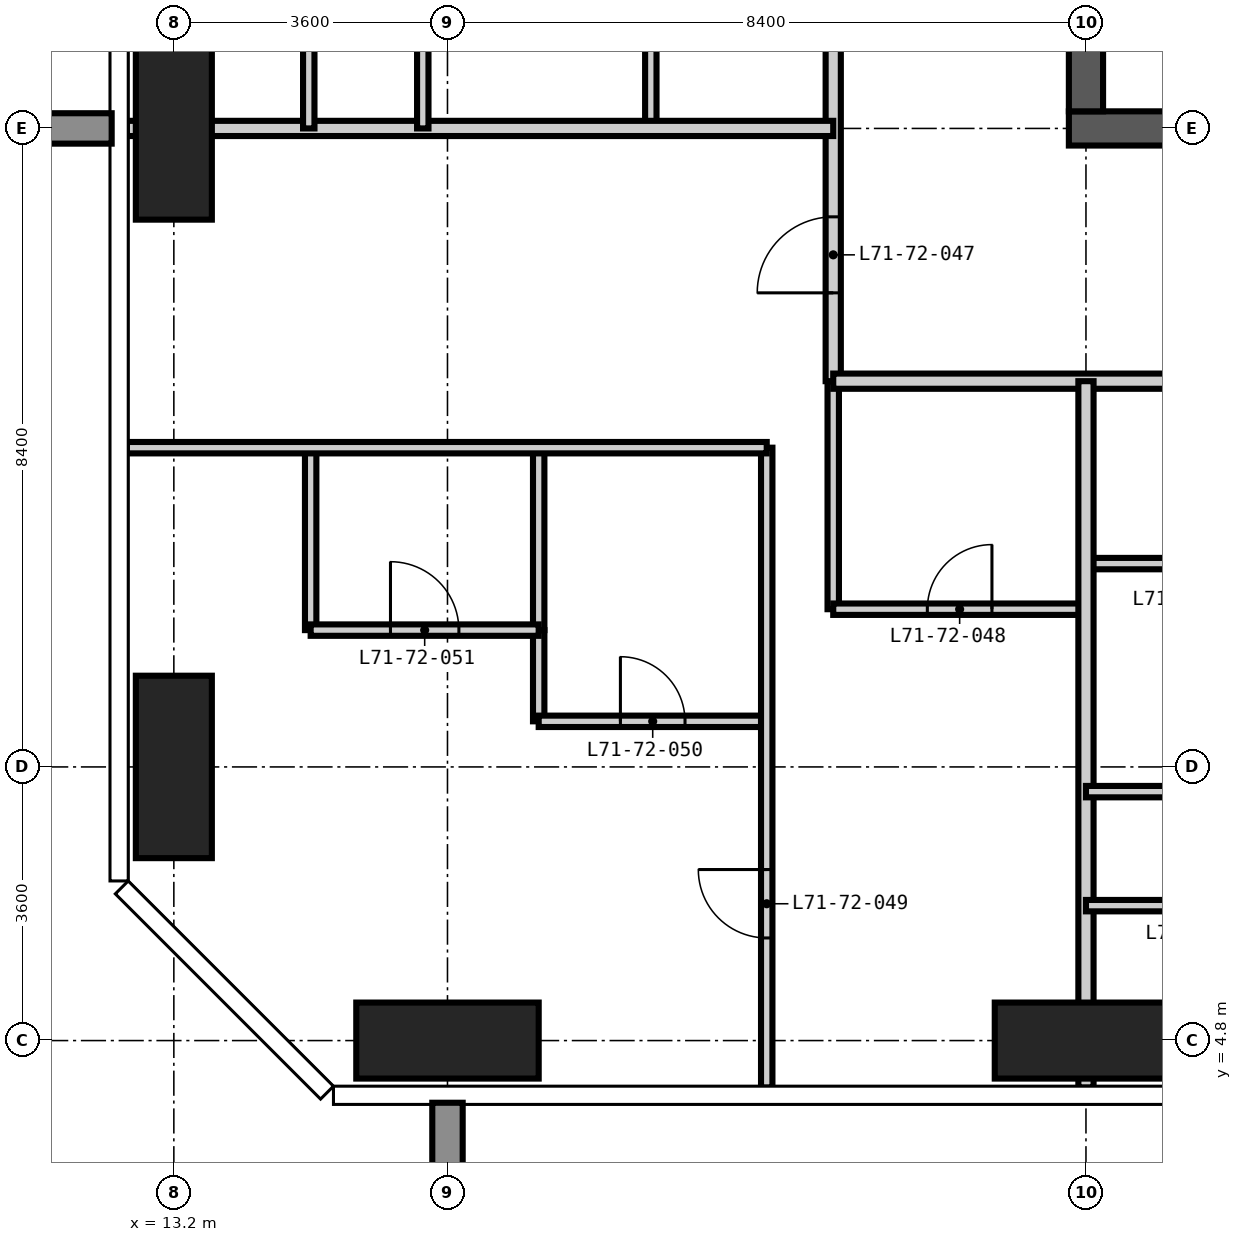
"""IFC4 building model, lengths in metres.
Left out: names, types, materials, properties, quantities, classifications, styles, units other than length and angle.
Written with IfcOpenShell. Run it as: python <this file> out.ifc"""

import sys

from ifc_helpers import new_model, si_unit, direction, frame, frame_2d, origin, origin_2d, place, context, subcontext, project, spatial, rectangle, extrude, element, fill, save


model = new_model("IFC4")
c1 = context("Model", 3, precision=1e-05, world=origin(), true_north=direction((0.0, 1.0)))
c2 = subcontext(c1, "Body", "Model", "MODEL_VIEW")
j1 = project(units=[si_unit("LENGTHUNIT", "METRE"), si_unit("PLANEANGLEUNIT", "RADIAN")], contexts=[c1])
p1 = place(None, origin())
s1 = spatial("IfcSite", under=j1, at=p1, CompositionType="ELEMENT")
p2 = place(p1, origin())
s2 = spatial("IfcBuilding", under=s1, at=p2, CompositionType="ELEMENT")
p3 = place(p2, frame((0.0, 0.0, 276.3)))
s3 = spatial("IfcBuildingStorey", under=s2, at=p3, CompositionType="ELEMENT", Elevation=276.3)
for number, where, z_axis, x_axis in (
    (1, (13.2, 8.4, -0.35), (0.0, 0.0, 1.0), (1.0, 0.0, 0.0)),
    (2, (13.2, 16.8, -0.35), (0.0, 0.0, 1.0), (1.0, 0.0, 0.0)),
):
    element("IfcColumn", number, at=place(p3, frame(where, z_axis=z_axis, x_axis=x_axis)), inside=s3, PredefinedType="COLUMN", context=c2, shape_type="SweptSolid", body=[
        extrude(rectangle(XDim=1.0, YDim=2.4, at=origin_2d()), origin(), (0.0, 0.0, 1.0), 3.9),
    ])
for number, where, z_axis, x_axis in (
    (3, (16.8, 4.8, -0.35), (0.0, 0.0, 1.0), (1.0, 0.0, 0.0)),
    (4, (25.2, 4.8, -0.35), (0.0, 0.0, 1.0), (1.0, 0.0, 0.0)),
):
    element("IfcColumn", number, at=place(p3, frame(where, z_axis=z_axis, x_axis=x_axis)), inside=s3, PredefinedType="COLUMN", context=c2, shape_type="SweptSolid", body=[
        extrude(rectangle(XDim=2.4, YDim=1.0, at=origin_2d()), origin(), (0.0, 0.0, 1.0), 3.9),
    ])
p4 = place(p3, frame((24.975, 16.8, -0.35), z_axis=(0.0, 0.0, 1.0), x_axis=(1.0, 0.0, 0.0)))
e5 = element("IfcWall", 5, at=p4, inside=s3, PredefinedType="SHEAR", context=c2, shape_type="SweptSolid", body=[
    extrude(rectangle(XDim=17.25, YDim=0.45, at=frame_2d((8.625, 0.0))), origin(), (0.0, 0.0, 1.0), 3.9),
])
p5 = place(p4, frame((3.925, 0.0, 0.35)))
e6 = element("IfcOpeningElement", 6, at=p5, cuts=e5, PredefinedType="OPENING", context=c2, shape_type="SweptSolid", body=[
    extrude(rectangle(XDim=1.0, YDim=2.1, at=frame_2d((0.5, 1.05))), frame((0.0, 0.235, 0.0), z_axis=(0.0, -1.0, 0.0), x_axis=(1.0, 0.0, 0.0)), (0.0, 0.0, 1.0), 0.47),
])
p6 = place(p4, frame((10.225, 0.0, 0.35)))
e7 = element("IfcOpeningElement", 7, at=p6, cuts=e5, PredefinedType="OPENING", context=c2, shape_type="SweptSolid", body=[
    extrude(rectangle(XDim=1.0, YDim=2.1, at=frame_2d((0.5, 1.05))), frame((0.0, 0.235, 0.0), z_axis=(0.0, -1.0, 0.0), x_axis=(1.0, 0.0, 0.0)), (0.0, 0.0, 1.0), 0.47),
])
p7 = place(p3, frame((25.2, 41.775, -0.35), z_axis=(0.0, 0.0, 1.0), x_axis=(0.0, -1.0, 0.0)))
e8 = element("IfcWall", 8, at=p7, inside=s3, PredefinedType="SHEAR", context=c2, shape_type="SweptSolid", body=[
    extrude(rectangle(XDim=24.75, YDim=0.45, at=frame_2d((12.375, 0.0))), origin(), (0.0, 0.0, 1.0), 3.9),
])
p8 = place(p7, frame((11.875, 0.0, 0.35)))
e9 = element("IfcOpeningElement", 9, at=p8, cuts=e8, PredefinedType="OPENING", context=c2, shape_type="SweptSolid", body=[
    extrude(rectangle(XDim=1.0, YDim=2.1, at=frame_2d((0.5, 1.05))), frame((0.0, 0.235, 0.0), z_axis=(0.0, -1.0, 0.0), x_axis=(1.0, 0.0, 0.0)), (0.0, 0.0, 1.0), 0.47),
])
p9 = place(p3, frame((18.0, 9.0, 0.0), z_axis=(0.0, 0.0, 1.0), x_axis=(0.0, 1.0, 0.0)))
e10 = element("IfcWall", 10, at=p9, inside=s3, PredefinedType="PARTITIONING", context=c2, shape_type="SweptSolid", body=[
    extrude(rectangle(XDim=1.2, YDim=0.15, at=frame_2d((0.6, 0.0))), origin(), (0.0, 0.0, 1.0), 3.55),
])
p10 = place(p3, frame((19.475, 16.8, 0.0), z_axis=(0.0, 0.0, 1.0), x_axis=(0.0, 1.0, 0.0)))
e11 = element("IfcWall", 11, at=p10, inside=s3, PredefinedType="PARTITIONING", context=c2, shape_type="SweptSolid", body=[
    extrude(rectangle(XDim=2.4, YDim=0.15, at=frame_2d((1.2, 0.0))), origin(), (0.0, 0.0, 1.0), 3.55),
])
p11 = place(p3, frame((21.875, 10.475, 0.0), z_axis=(0.0, 0.0, 1.0), x_axis=(0.0, 1.0, 0.0)))
e12 = element("IfcWall", 12, at=p11, inside=s3, PredefinedType="PARTITIONING", context=c2, shape_type="SweptSolid", body=[
    extrude(rectangle(XDim=3.0, YDim=0.15, at=frame_2d((1.5, 0.0))), origin(), (0.0, 0.0, 1.0), 3.55),
])
p12 = place(p3, frame((18.0, 9.0, 0.0), z_axis=(0.0, 0.0, 1.0), x_axis=(1.0, 0.0, 0.0)))
e13 = element("IfcWall", 13, at=p12, inside=s3, PredefinedType="PARTITIONING", context=c2, shape_type="SweptSolid", body=[
    extrude(rectangle(XDim=3.0, YDim=0.15, at=frame_2d((1.5, 0.0))), origin(), (0.0, 0.0, 1.0), 3.55),
])
p13 = place(p12, frame((1.075, 0.0, 0.0)))
e14 = element("IfcOpeningElement", 14, at=p13, cuts=e13, PredefinedType="OPENING", context=c2, shape_type="SweptSolid", body=[
    extrude(rectangle(XDim=0.85, YDim=2.1, at=frame_2d((0.425, 1.05))), frame((0.0, 0.085, 0.0), z_axis=(0.0, -1.0, 0.0), x_axis=(1.0, 0.0, 0.0)), (0.0, 0.0, 1.0), 0.17),
])
p14 = place(p3, frame((21.875, 10.475, 0.0), z_axis=(0.0, 0.0, 1.0), x_axis=(1.0, 0.0, 0.0)))
e15 = element("IfcWall", 15, at=p14, inside=s3, PredefinedType="PARTITIONING", context=c2, shape_type="SweptSolid", body=[
    extrude(rectangle(XDim=3.325, YDim=0.15, at=frame_2d((1.663, 0.0))), origin(), (0.0, 0.0, 1.0), 3.55),
])
p15 = place(p14, frame((1.238, 0.0, 0.0)))
e16 = element("IfcOpeningElement", 16, at=p15, cuts=e15, PredefinedType="OPENING", context=c2, shape_type="SweptSolid", body=[
    extrude(rectangle(XDim=0.85, YDim=2.1, at=frame_2d((0.425, 1.05))), frame((0.0, 0.085, 0.0), z_axis=(0.0, -1.0, 0.0), x_axis=(1.0, 0.0, 0.0)), (0.0, 0.0, 1.0), 0.17),
])
p16 = place(p3, frame((25.2, 11.075, 0.0), z_axis=(0.0, 0.0, 1.0), x_axis=(1.0, 0.0, 0.0)))
e17 = element("IfcWall", 17, at=p16, inside=s3, PredefinedType="PARTITIONING", context=c2, shape_type="SweptSolid", body=[
    extrude(rectangle(XDim=2.4, YDim=0.15, at=frame_2d((1.2, 0.0))), origin(), (0.0, 0.0, 1.0), 3.55),
])
p17 = place(p3, frame((21.875, 13.475, 0.0), z_axis=(0.0, 0.0, 1.0), x_axis=(0.0, 1.0, 0.0)))
e18 = element("IfcWall", 18, at=p17, inside=s3, PredefinedType="PARTITIONING", context=c2, shape_type="SweptSolid", body=[
    extrude(rectangle(XDim=31.25, YDim=0.2, at=frame_2d((15.625, 0.0))), origin(), (0.0, 0.0, 1.0), 3.55),
])
p18 = place(p17, frame((4.925, 0.0, 0.0)))
e19 = element("IfcOpeningElement", 19, at=p18, cuts=e18, PredefinedType="OPENING", context=c2, shape_type="SweptSolid", body=[
    extrude(rectangle(XDim=1.0, YDim=2.2, at=frame_2d((0.5, 1.1))), frame((0.0, 0.11, 0.0), z_axis=(0.0, -1.0, 0.0), x_axis=(1.0, 0.0, 0.0)), (0.0, 0.0, 1.0), 0.22),
])
p19 = place(p17, frame((11.225, 0.0, 0.0)))
e20 = element("IfcOpeningElement", 20, at=p19, cuts=e18, PredefinedType="OPENING", context=c2, shape_type="SweptSolid", body=[
    extrude(rectangle(XDim=1.0, YDim=2.2, at=frame_2d((0.5, 1.1))), frame((0.0, 0.11, 0.0), z_axis=(0.0, -1.0, 0.0), x_axis=(1.0, 0.0, 0.0)), (0.0, 0.0, 1.0), 0.22),
])
p20 = place(p17, frame((19.625, 0.0, 0.0)))
e21 = element("IfcOpeningElement", 21, at=p20, cuts=e18, PredefinedType="OPENING", context=c2, shape_type="SweptSolid", body=[
    extrude(rectangle(XDim=1.0, YDim=2.2, at=frame_2d((0.5, 1.1))), frame((0.0, 0.11, 0.0), z_axis=(0.0, -1.0, 0.0), x_axis=(1.0, 0.0, 0.0)), (0.0, 0.0, 1.0), 0.22),
])
p21 = place(p17, frame((25.925, 0.0, 0.0)))
e22 = element("IfcOpeningElement", 22, at=p21, cuts=e18, PredefinedType="OPENING", context=c2, shape_type="SweptSolid", body=[
    extrude(rectangle(XDim=1.0, YDim=2.2, at=frame_2d((0.5, 1.1))), frame((0.0, 0.11, 0.0), z_axis=(0.0, -1.0, 0.0), x_axis=(1.0, 0.0, 0.0)), (0.0, 0.0, 1.0), 0.22),
])
p22 = place(p17, frame((1.162, 0.0, 0.0)))
e23 = element("IfcOpeningElement", 23, at=p22, cuts=e18, PredefinedType="OPENING", context=c2, shape_type="SweptSolid", body=[
    extrude(rectangle(XDim=1.0, YDim=2.2, at=frame_2d((0.5, 1.1))), frame((0.0, 0.11, 0.0), z_axis=(0.0, -1.0, 0.0), x_axis=(1.0, 0.0, 0.0)), (0.0, 0.0, 1.0), 0.22),
])
p23 = place(p17, frame((29.387, 0.0, 0.0)))
e24 = element("IfcOpeningElement", 24, at=p23, cuts=e18, PredefinedType="OPENING", context=c2, shape_type="SweptSolid", body=[
    extrude(rectangle(XDim=1.0, YDim=2.2, at=frame_2d((0.5, 1.1))), frame((0.0, 0.11, 0.0), z_axis=(0.0, -1.0, 0.0), x_axis=(1.0, 0.0, 0.0)), (0.0, 0.0, 1.0), 0.22),
])
p24 = place(p3, frame((44.125, 13.475, 0.0), z_axis=(0.0, 0.0, 1.0), x_axis=(-1.0, 0.0, 0.0)))
e25 = element("IfcWall", 25, at=p24, inside=s3, PredefinedType="PARTITIONING", context=c2, shape_type="SweptSolid", body=[
    extrude(rectangle(XDim=22.25, YDim=0.2, at=frame_2d((11.125, 0.0))), origin(), (0.0, 0.0, 1.0), 3.55),
])
p25 = place(p24, frame((11.225, 0.0, 0.0)))
e26 = element("IfcOpeningElement", 26, at=p25, cuts=e25, PredefinedType="OPENING", context=c2, shape_type="SweptSolid", body=[
    extrude(rectangle(XDim=1.0, YDim=2.2, at=frame_2d((0.5, 1.1))), frame((0.0, 0.11, 0.0), z_axis=(0.0, -1.0, 0.0), x_axis=(1.0, 0.0, 0.0)), (0.0, 0.0, 1.0), 0.22),
])
p26 = place(p3, frame((25.2, 4.182, 0.0), z_axis=(0.0, 0.0, 1.0), x_axis=(0.0, 1.0, 0.0)))
e27 = element("IfcWall", 27, at=p26, inside=s3, PredefinedType="PARTITIONING", context=c2, shape_type="SweptSolid", body=[
    extrude(rectangle(XDim=9.293, YDim=0.2, at=frame_2d((4.646, 0.0))), origin(), (0.0, 0.0, 1.0), 3.55),
])
p27 = place(p3, frame((12.582, 16.8, 0.0), z_axis=(0.0, 0.0, 1.0), x_axis=(1.0, 0.0, 0.0)))
e28 = element("IfcWall", 28, at=p27, inside=s3, PredefinedType="PARTITIONING", context=c2, shape_type="SweptSolid", body=[
    extrude(rectangle(XDim=9.293, YDim=0.2, at=frame_2d((4.646, 0.0))), origin(), (0.0, 0.0, 1.0), 3.55),
])
p28 = place(p3, frame((14.975, 16.8, 0.0), z_axis=(0.0, 0.0, 1.0), x_axis=(0.0, 1.0, 0.0)))
e29 = element("IfcWall", 29, at=p28, inside=s3, PredefinedType="PARTITIONING", context=c2, shape_type="SweptSolid", body=[
    extrude(rectangle(XDim=2.4, YDim=0.15, at=frame_2d((1.2, 0.0))), origin(), (0.0, 0.0, 1.0), 3.55),
])
p29 = place(p28, frame((1.25, 0.0, 0.0)))
e30 = element("IfcOpeningElement", 30, at=p29, cuts=e29, PredefinedType="OPENING", context=c2, shape_type="SweptSolid", body=[
    extrude(rectangle(XDim=0.9, YDim=2.1, at=frame_2d((0.45, 1.05))), frame((0.0, 0.085, 0.0), z_axis=(0.0, -1.0, 0.0), x_axis=(1.0, 0.0, 0.0)), (0.0, 0.0, 1.0), 0.17),
])
p30 = place(p3, frame((15.0, 10.2, 0.0), z_axis=(0.0, 0.0, 1.0), x_axis=(0.0, 1.0, 0.0)))
e31 = element("IfcWall", 31, at=p30, inside=s3, PredefinedType="PARTITIONING", context=c2, shape_type="SweptSolid", body=[
    extrude(rectangle(XDim=2.4, YDim=0.15, at=frame_2d((1.2, 0.0))), origin(), (0.0, 0.0, 1.0), 3.55),
])
p31 = place(p3, frame((16.475, 16.8, 0.0), z_axis=(0.0, 0.0, 1.0), x_axis=(0.0, 1.0, 0.0)))
e32 = element("IfcWall", 32, at=p31, inside=s3, PredefinedType="PARTITIONING", context=c2, shape_type="SweptSolid", body=[
    extrude(rectangle(XDim=2.4, YDim=0.15, at=frame_2d((1.2, 0.0))), origin(), (0.0, 0.0, 1.0), 3.55),
])
p32 = place(p3, frame((18.0, 10.2, 0.0), z_axis=(0.0, 0.0, 1.0), x_axis=(0.0, 1.0, 0.0)))
e33 = element("IfcWall", 33, at=p32, inside=s3, PredefinedType="PARTITIONING", context=c2, shape_type="SweptSolid", body=[
    extrude(rectangle(XDim=2.4, YDim=0.15, at=frame_2d((1.2, 0.0))), origin(), (0.0, 0.0, 1.0), 3.55),
])
p33 = place(p3, frame((21.0, 4.182, 0.0), z_axis=(0.0, 0.0, 1.0), x_axis=(0.0, 1.0, 0.0)))
e34 = element("IfcWall", 34, at=p33, inside=s3, PredefinedType="PARTITIONING", context=c2, shape_type="SweptSolid", body=[
    extrude(rectangle(XDim=8.418, YDim=0.15, at=frame_2d((4.209, 0.0))), origin(), (0.0, 0.0, 1.0), 3.55),
])
p34 = place(p33, frame((1.968, 0.0, 0.0)))
e35 = element("IfcOpeningElement", 35, at=p34, cuts=e34, PredefinedType="OPENING", context=c2, shape_type="SweptSolid", body=[
    extrude(rectangle(XDim=0.9, YDim=2.1, at=frame_2d((0.45, 1.05))), frame((0.0, 0.085, 0.0), z_axis=(0.0, -1.0, 0.0), x_axis=(1.0, 0.0, 0.0)), (0.0, 0.0, 1.0), 0.17),
])
p35 = place(p3, frame((25.2, 6.575, 0.0), z_axis=(0.0, 0.0, 1.0), x_axis=(1.0, 0.0, 0.0)))
e36 = element("IfcWall", 36, at=p35, inside=s3, PredefinedType="PARTITIONING", context=c2, shape_type="SweptSolid", body=[
    extrude(rectangle(XDim=2.4, YDim=0.15, at=frame_2d((1.2, 0.0))), origin(), (0.0, 0.0, 1.0), 3.55),
])
p36 = place(p35, frame((1.25, 0.0, 0.0)))
e37 = element("IfcOpeningElement", 37, at=p36, cuts=e36, PredefinedType="OPENING", context=c2, shape_type="SweptSolid", body=[
    extrude(rectangle(XDim=0.9, YDim=2.1, at=frame_2d((0.45, 1.05))), frame((0.0, 0.085, 0.0), z_axis=(0.0, -1.0, 0.0), x_axis=(1.0, 0.0, 0.0)), (0.0, 0.0, 1.0), 0.17),
])
p37 = place(p3, frame((25.2, 8.075, 0.0), z_axis=(0.0, 0.0, 1.0), x_axis=(1.0, 0.0, 0.0)))
e38 = element("IfcWall", 38, at=p37, inside=s3, PredefinedType="PARTITIONING", context=c2, shape_type="SweptSolid", body=[
    extrude(rectangle(XDim=2.4, YDim=0.15, at=frame_2d((1.2, 0.0))), origin(), (0.0, 0.0, 1.0), 3.55),
])
p38 = place(p3, frame((15.0, 10.2, 0.0), z_axis=(0.0, 0.0, 1.0), x_axis=(1.0, 0.0, 0.0)))
e39 = element("IfcWall", 39, at=p38, inside=s3, PredefinedType="PARTITIONING", context=c2, shape_type="SweptSolid", body=[
    extrude(rectangle(XDim=3.0, YDim=0.15, at=frame_2d((1.5, 0.0))), origin(), (0.0, 0.0, 1.0), 3.55),
])
p39 = place(p38, frame((1.05, 0.0, 0.0)))
e40 = element("IfcOpeningElement", 40, at=p39, cuts=e39, PredefinedType="OPENING", context=c2, shape_type="SweptSolid", body=[
    extrude(rectangle(XDim=0.9, YDim=2.1, at=frame_2d((0.45, 1.05))), frame((0.0, 0.085, 0.0), z_axis=(0.0, -1.0, 0.0), x_axis=(1.0, 0.0, 0.0)), (0.0, 0.0, 1.0), 0.17),
])
p40 = place(p3, frame((12.582, 12.6, 0.0), z_axis=(0.0, 0.0, 1.0), x_axis=(1.0, 0.0, 0.0)))
e41 = element("IfcWall", 41, at=p40, inside=s3, PredefinedType="PARTITIONING", context=c2, shape_type="SweptSolid", body=[
    extrude(rectangle(XDim=8.418, YDim=0.15, at=frame_2d((4.209, 0.0))), origin(), (0.0, 0.0, 1.0), 3.55),
])
p41 = place(p22, origin())
e42 = element("IfcDoor", 42, at=p41, inside=s3, OperationType="SINGLE_SWING_LEFT", PredefinedType="DOOR", context=c2, shape_type="SweptSolid", body=[
    extrude(rectangle(XDim=1.0, YDim=2.2, at=frame_2d((0.5, 1.1))), frame((0.0, 0.025, 0.0), z_axis=(0.0, -1.0, 0.0), x_axis=(1.0, 0.0, 0.0)), (0.0, 0.0, 1.0), 0.05),
])
fill(e23, e42)
p42 = place(p15, origin())
e43 = element("IfcDoor", 43, at=p42, inside=s3, OperationType="SINGLE_SWING_RIGHT", PredefinedType="DOOR", context=c2, shape_type="SweptSolid", body=[
    extrude(rectangle(XDim=0.85, YDim=2.1, at=frame_2d((0.425, 1.05))), frame((0.0, 0.025, 0.0), z_axis=(0.0, -1.0, 0.0), x_axis=(1.0, 0.0, 0.0)), (0.0, 0.0, 1.0), 0.05),
])
fill(e16, e43)
p43 = place(p34, origin())
e44 = element("IfcDoor", 44, at=p43, inside=s3, OperationType="SINGLE_SWING_RIGHT", PredefinedType="DOOR", context=c2, shape_type="SweptSolid", body=[
    extrude(rectangle(XDim=0.9, YDim=2.1, at=frame_2d((0.45, 1.05))), frame((0.0, 0.025, 0.0), z_axis=(0.0, -1.0, 0.0), x_axis=(1.0, 0.0, 0.0)), (0.0, 0.0, 1.0), 0.05),
])
fill(e35, e44)
p44 = place(p13, origin())
e45 = element("IfcDoor", 45, at=p44, inside=s3, OperationType="SINGLE_SWING_LEFT", PredefinedType="DOOR", context=c2, shape_type="SweptSolid", body=[
    extrude(rectangle(XDim=0.85, YDim=2.1, at=frame_2d((0.425, 1.05))), frame((0.0, 0.025, 0.0), z_axis=(0.0, -1.0, 0.0), x_axis=(1.0, 0.0, 0.0)), (0.0, 0.0, 1.0), 0.05),
])
fill(e14, e45)
p45 = place(p39, origin())
e46 = element("IfcDoor", 46, at=p45, inside=s3, OperationType="SINGLE_SWING_LEFT", PredefinedType="DOOR", context=c2, shape_type="SweptSolid", body=[
    extrude(rectangle(XDim=0.9, YDim=2.1, at=frame_2d((0.45, 1.05))), frame((0.0, 0.025, 0.0), z_axis=(0.0, -1.0, 0.0), x_axis=(1.0, 0.0, 0.0)), (0.0, 0.0, 1.0), 0.05),
])
fill(e40, e46)
save(model, sys.argv[1])
